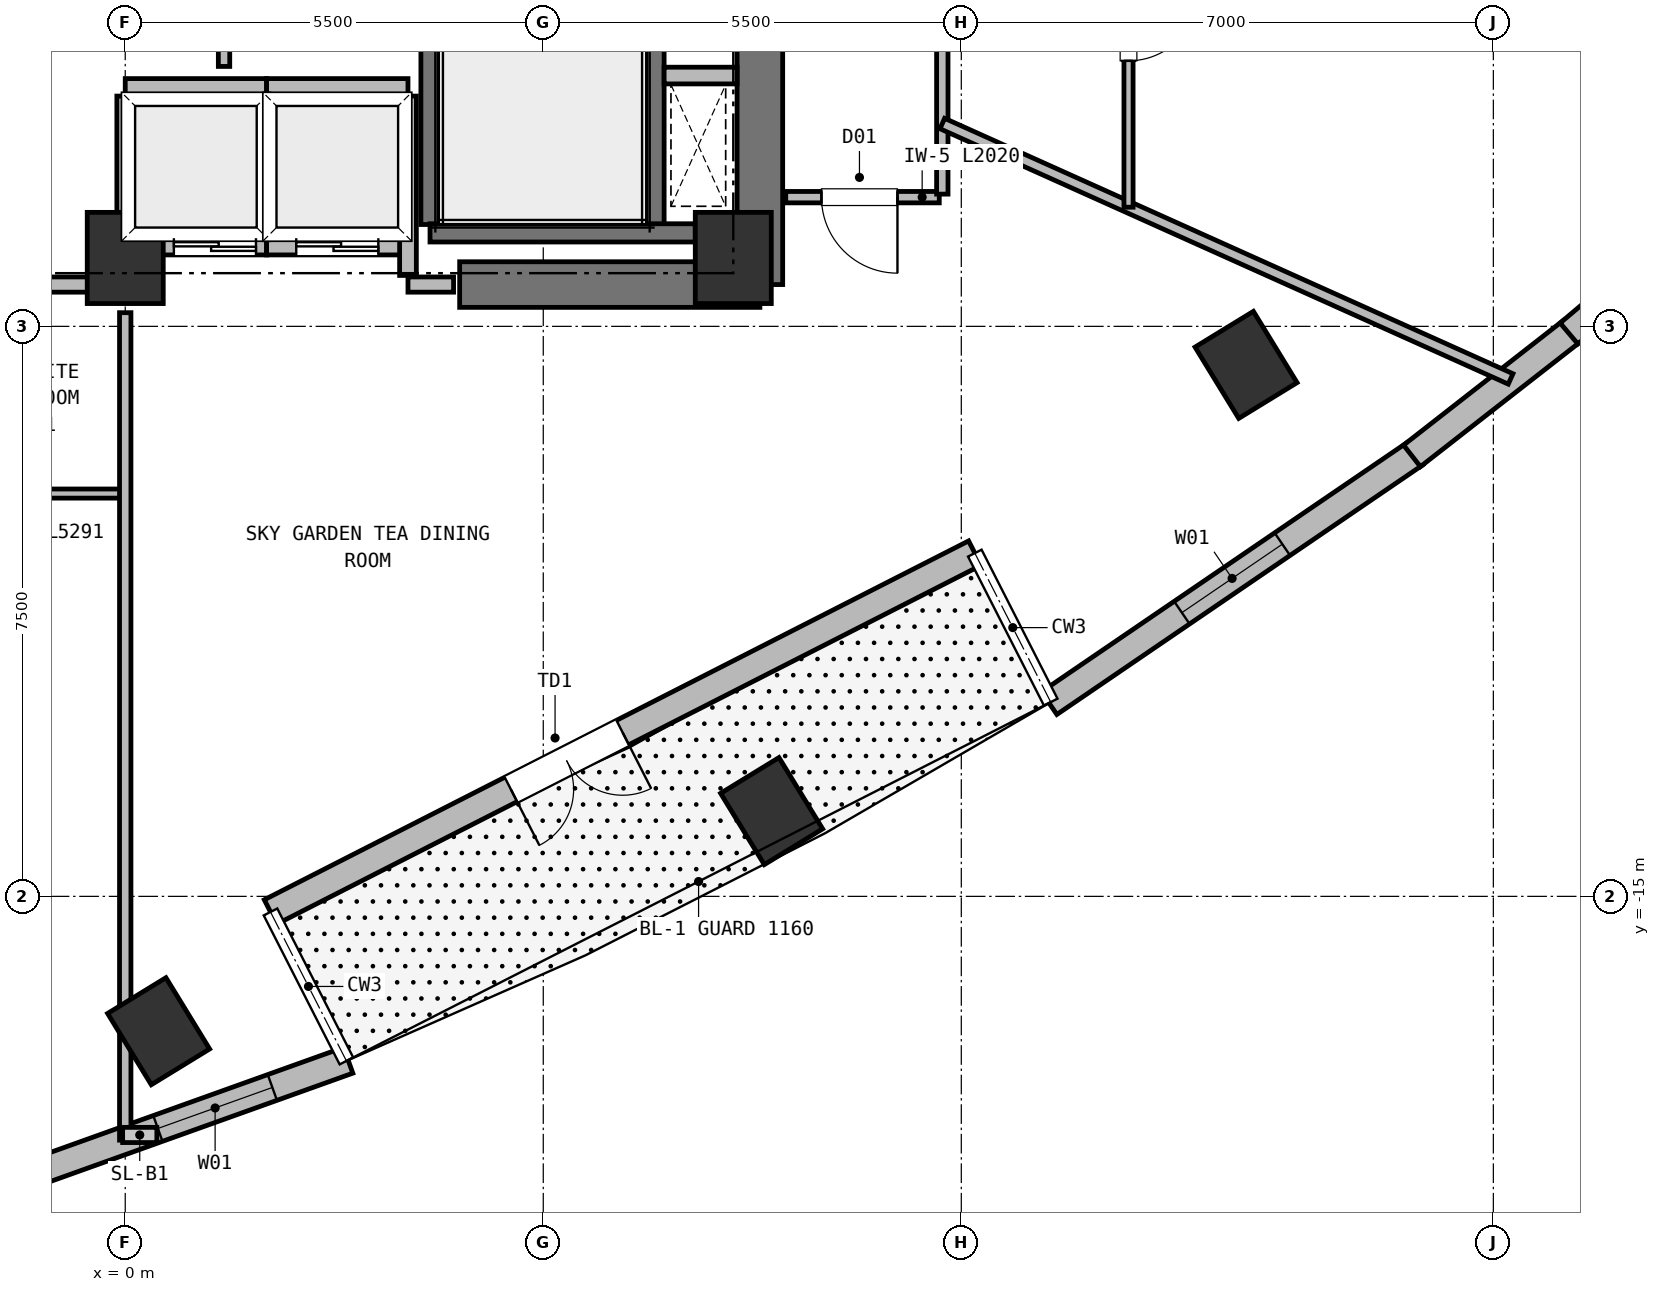
"""IFC4 building model, lengths in metres.
Left out: names, types, materials, properties, quantities, classifications, styles, units other than length and angle.
Written with IfcOpenShell. Run it as: python <this file> out.ifc"""

import sys

from ifc_helpers import new_model, si_unit, direction, frame, frame_2d, origin, origin_2d, place, context, subcontext, project, spatial, rectangle, extrude, element, fill, save


model = new_model("IFC4")
c1 = context("Model", 3, precision=1e-05, world=origin(), true_north=direction((0.0, 1.0)))
c2 = subcontext(c1, "Body", "Model", "MODEL_VIEW")
j1 = project(units=[si_unit("LENGTHUNIT", "METRE"), si_unit("PLANEANGLEUNIT", "RADIAN")], contexts=[c1])
p1 = place(None, origin())
s1 = spatial("IfcSite", under=j1, at=p1, CompositionType="ELEMENT")
p2 = place(p1, origin())
s2 = spatial("IfcBuilding", under=s1, at=p2, CompositionType="ELEMENT")
p3 = place(p2, frame((0.0, 0.0, 108.5)))
s3 = spatial("IfcBuildingStorey", under=s2, at=p3, CompositionType="ELEMENT", Elevation=108.5)
for number, where, z_axis, x_axis in (
    (1, (0.0, -6.6, 0.0), (0.0, 0.0, 1.0), (1.0, 0.0, 0.0)),
    (2, (8.0, -6.6, 0.0), (0.0, 0.0, 1.0), (1.0, 0.0, 0.0)),
):
    element("IfcColumn", number, at=place(p3, frame(where, z_axis=z_axis, x_axis=x_axis)), inside=s3, PredefinedType="COLUMN", context=c2, shape_type="SweptSolid", body=[
        extrude(rectangle(XDim=1.0, YDim=1.2, at=origin_2d()), origin(), (0.0, 0.0, 1.0), 3.75),
    ])
p4 = place(p3, frame((4.4, -6.95, 0.0), z_axis=(0.0, 0.0, 1.0), x_axis=(1.0, 0.0, 0.0)))
e3 = element("IfcWall", 3, at=p4, inside=s3, PredefinedType="SHEAR", context=c2, shape_type="SweptSolid", body=[
    extrude(rectangle(XDim=3.95, YDim=0.6, at=frame_2d((1.975, 0.0))), origin(), (0.0, 0.0, 1.0), 3.5),
])
p5 = place(p3, frame((8.35, -6.95, 0.0), z_axis=(0.0, 0.0, 1.0), x_axis=(0.0, 1.0, 0.0)))
e4 = element("IfcWall", 4, at=p5, inside=s3, PredefinedType="SHEAR", context=c2, shape_type="SweptSolid", body=[
    extrude(rectangle(XDim=8.1, YDim=0.6, at=frame_2d((4.05, 0.0))), origin(), (0.0, 0.0, 1.0), 3.5),
])
for number, where, z_axis, x_axis in (
    (5, (0.439, -16.774, 0.0), (0.0, 0.0, 1.0), (0.853, 0.522, 0.0)),
    (6, (8.504, -13.878, 0.0), (0.0, 0.0, 1.0), (0.853, 0.522, 0.0)),
    (7, (14.747, -8.007, 0.0), (0.0, 0.0, 1.0), (0.853, 0.522, 0.0)),
):
    element("IfcColumn", number, at=place(p3, frame(where, z_axis=z_axis, x_axis=x_axis)), inside=s3, PredefinedType="COLUMN", context=c2, shape_type="SweptSolid", body=[
        extrude(rectangle(XDim=0.9, YDim=1.1, at=origin_2d()), origin(), (0.0, 0.0, 1.0), 3.75),
    ])
p6 = place(p3, frame((11.178, -10.484, 0.0), z_axis=(0.0, 0.0, 1.0), x_axis=(-0.891006889171, -0.453989783419, 0.0)))
e8 = element("IfcWall", 8, at=p6, inside=s3, PredefinedType="SOLIDWALL", context=c2, shape_type="SweptSolid", body=[
    extrude(rectangle(XDim=10.4, YDim=0.36, at=frame_2d((5.2, 0.0))), origin(), (0.0, 0.0, 1.0), 3.15),
])
p7 = place(p6, frame((5.2, 0.0, 0.0)))
e9 = element("IfcOpeningElement", 9, at=p7, cuts=e8, PredefinedType="OPENING", context=c2, shape_type="SweptSolid", body=[
    extrude(rectangle(XDim=1.65, YDim=2.25, at=frame_2d((0.825, 1.125))), frame((0.0, 0.19, 0.0), z_axis=(0.0, -1.0, 0.0), x_axis=(1.0, 0.0, 0.0)), (0.0, 0.0, 1.0), 0.38),
])
p8 = place(p3, frame((2.934, -17.157, 0.0), z_axis=(0.0, 0.0, 1.0), x_axis=(-0.941431533916, -0.337204191773, 0.0)))
e10 = element("IfcWall", 10, at=p8, inside=s3, PredefinedType="SOLIDWALL", context=c2, shape_type="SweptSolid", body=[
    extrude(rectangle(XDim=5.827, YDim=0.36, at=frame_2d((2.914, 0.0))), origin(), (0.0, 0.0, 1.0), 3.5),
])
p9 = place(p8, frame((1.06, 0.0, 0.72)))
e11 = element("IfcOpeningElement", 11, at=p9, cuts=e10, PredefinedType="OPENING", context=c2, shape_type="SweptSolid", body=[
    extrude(rectangle(XDim=1.6, YDim=1.88, at=frame_2d((0.8, 0.94))), frame((0.0, 0.19, 0.0), z_axis=(0.0, -1.0, 0.0), x_axis=(1.0, 0.0, 0.0)), (0.0, 0.0, 1.0), 0.38),
])
p10 = place(p3, frame((16.97, -9.175, 0.0), z_axis=(0.0, 0.0, 1.0), x_axis=(-0.826151102753, -0.563448627134, 0.0)))
e12 = element("IfcWall", 12, at=p10, inside=s3, PredefinedType="SOLIDWALL", context=c2, shape_type="SweptSolid", body=[
    extrude(rectangle(XDim=5.827, YDim=0.36, at=frame_2d((2.914, 0.0))), origin(), (0.0, 0.0, 1.0), 3.5),
])
p11 = place(p10, frame((2.113, 0.0, 0.72)))
e13 = element("IfcOpeningElement", 13, at=p11, cuts=e12, PredefinedType="OPENING", context=c2, shape_type="SweptSolid", body=[
    extrude(rectangle(XDim=1.6, YDim=1.88, at=frame_2d((0.8, 0.94))), frame((0.0, 0.19, 0.0), z_axis=(0.0, -1.0, 0.0), x_axis=(1.0, 0.0, 0.0)), (0.0, 0.0, 1.0), 0.38),
])
p12 = place(p3, frame((19.034, -7.562, 0.0), z_axis=(0.0, 0.0, 1.0), x_axis=(-0.788341745542, -0.615237590071, 0.0)))
e14 = element("IfcWall", 14, at=p12, inside=s3, PredefinedType="SOLIDWALL", context=c2, shape_type="SweptSolid", body=[
    extrude(rectangle(XDim=2.67, YDim=0.36, at=frame_2d((1.335, 0.0))), origin(), (0.0, 0.0, 1.0), 3.5),
])
p13 = place(p3, frame((21.051, -5.856, 0.0), z_axis=(0.0, 0.0, 1.0), x_axis=(-0.763688985819, -0.64558433449, 0.0)))
e15 = element("IfcWall", 15, at=p13, inside=s3, PredefinedType="SOLIDWALL", context=c2, shape_type="SweptSolid", body=[
    extrude(rectangle(XDim=2.691, YDim=0.36, at=frame_2d((1.346, 0.0))), origin(), (0.0, 0.0, 1.0), 3.5),
])
p14 = place(p13, frame((0.646, 0.0, 0.72)))
e16 = element("IfcOpeningElement", 16, at=p14, cuts=e15, PredefinedType="OPENING", context=c2, shape_type="SweptSolid", body=[
    extrude(rectangle(XDim=1.4, YDim=1.84, at=frame_2d((0.7, 0.92))), frame((0.0, 0.19, 0.0), z_axis=(0.0, -1.0, 0.0), x_axis=(1.0, 0.0, 0.0)), (0.0, 0.0, 1.0), 0.38),
])
for number, where, z_axis, x_axis in (
    (17, (4.01, -6.16, 0.0), (0.0, 0.0, 1.0), (0.0, 1.0, 0.0)),
    (18, (6.97, -6.16, 0.0), (0.0, 0.0, 1.0), (0.0, 1.0, 0.0)),
):
    element("IfcWall", number, at=place(p3, frame(where, z_axis=z_axis, x_axis=x_axis)), inside=s3, PredefinedType="SHEAR", context=c2, shape_type="SweptSolid", body=[
        extrude(rectangle(XDim=7.22, YDim=0.24, at=frame_2d((3.61, 0.0))), origin(), (0.0, 0.0, 1.0), 3.5),
    ])
p15 = place(p3, frame((4.01, -6.27, 0.0), z_axis=(0.0, 0.0, 1.0), x_axis=(1.0, 0.0, 0.0)))
e19 = element("IfcWall", 19, at=p15, inside=s3, PredefinedType="SHEAR", context=c2, shape_type="SweptSolid", body=[
    extrude(rectangle(XDim=3.49, YDim=0.24, at=frame_2d((1.745, 0.0))), origin(), (0.0, 0.0, 1.0), 3.5),
])
p16 = place(p3, frame((7.09, -4.2, 0.0), z_axis=(0.0, 0.0, 1.0), x_axis=(1.0, 0.0, 0.0)))
e20 = element("IfcWall", 20, at=p16, inside=s3, PredefinedType="PARTITIONING", context=c2, shape_type="SweptSolid", body=[
    extrude(rectangle(XDim=0.96, YDim=0.22, at=frame_2d((0.48, 0.0))), origin(), (0.0, 0.0, 1.0), 3.5),
])
p17 = place(p3, frame((0.0, -6.45, 0.0), z_axis=(0.0, 0.0, 1.0), x_axis=(1.0, 0.0, 0.0)))
e21 = element("IfcWall", 21, at=p17, inside=s3, PredefinedType="PARTITIONING", context=c2, shape_type="SweptSolid", body=[
    extrude(rectangle(XDim=1.86, YDim=0.22, at=frame_2d((0.93, 0.0))), origin(), (0.0, 0.0, 1.0), 3.12),
])
p18 = place(p17, frame((0.64, 0.0, 0.0)))
e22 = element("IfcOpeningElement", 22, at=p18, cuts=e21, PredefinedType="OPENING", context=c2, shape_type="SweptSolid", body=[
    extrude(rectangle(XDim=1.08, YDim=2.15, at=frame_2d((0.54, 1.075))), frame((0.0, 0.12, 0.0), z_axis=(0.0, -1.0, 0.0), x_axis=(1.0, 0.0, 0.0)), (0.0, 0.0, 1.0), 0.24),
])
for number, where, z_axis, x_axis in (
    (23, (0.0, -4.35, 0.0), (0.0, 0.0, 1.0), (1.0, 0.0, 0.0)),
    (24, (0.0, -6.33, 0.0), (0.0, 0.0, 1.0), (0.0, 1.0, 0.0)),
    (25, (1.86, -6.33, 0.0), (0.0, 0.0, 1.0), (0.0, 1.0, 0.0)),
):
    element("IfcWall", number, at=place(p3, frame(where, z_axis=z_axis, x_axis=x_axis)), inside=s3, PredefinedType="PARTITIONING", context=c2, shape_type="SweptSolid", body=[
        extrude(rectangle(XDim=1.86, YDim=0.22, at=frame_2d((0.93, 0.0))), origin(), (0.0, 0.0, 1.0), 3.5),
    ])
p19 = place(p3, frame((1.86, -6.45, 0.0), z_axis=(0.0, 0.0, 1.0), x_axis=(1.0, 0.0, 0.0)))
e26 = element("IfcWall", 26, at=p19, inside=s3, PredefinedType="PARTITIONING", context=c2, shape_type="SweptSolid", body=[
    extrude(rectangle(XDim=1.86, YDim=0.22, at=frame_2d((0.93, 0.0))), origin(), (0.0, 0.0, 1.0), 3.12),
])
p20 = place(p19, frame((0.39, 0.0, 0.0)))
e27 = element("IfcOpeningElement", 27, at=p20, cuts=e26, PredefinedType="OPENING", context=c2, shape_type="SweptSolid", body=[
    extrude(rectangle(XDim=1.08, YDim=2.15, at=frame_2d((0.54, 1.075))), frame((0.0, 0.12, 0.0), z_axis=(0.0, -1.0, 0.0), x_axis=(1.0, 0.0, 0.0)), (0.0, 0.0, 1.0), 0.24),
])
p21 = place(p3, frame((1.86, -4.35, 0.0), z_axis=(0.0, 0.0, 1.0), x_axis=(1.0, 0.0, 0.0)))
e28 = element("IfcWall", 28, at=p21, inside=s3, PredefinedType="PARTITIONING", context=c2, shape_type="SweptSolid", body=[
    extrude(rectangle(XDim=1.86, YDim=0.22, at=frame_2d((0.93, 0.0))), origin(), (0.0, 0.0, 1.0), 3.5),
])
p22 = place(p3, frame((3.72, -6.83, 0.0), z_axis=(0.0, 0.0, 1.0), x_axis=(0.0, 1.0, 0.0)))
e29 = element("IfcWall", 29, at=p22, inside=s3, PredefinedType="PARTITIONING", context=c2, shape_type="SweptSolid", body=[
    extrude(rectangle(XDim=2.36, YDim=0.22, at=frame_2d((1.18, 0.0))), origin(), (0.0, 0.0, 1.0), 3.5),
])
p23 = place(p3, frame((-4.32, -6.95, 0.0), z_axis=(0.0, 0.0, 1.0), x_axis=(1.0, 0.0, 0.0)))
e30 = element("IfcWall", 30, at=p23, inside=s3, PredefinedType="PARTITIONING", context=c2, shape_type="SweptSolid", body=[
    extrude(rectangle(XDim=4.32, YDim=0.2, at=frame_2d((2.16, 0.0))), origin(), (0.0, 0.0, 1.0), 3.5),
])
p24 = place(p3, frame((3.72, -6.95, 0.0), z_axis=(0.0, 0.0, 1.0), x_axis=(1.0, 0.0, 0.0)))
e31 = element("IfcWall", 31, at=p24, inside=s3, PredefinedType="PARTITIONING", context=c2, shape_type="SweptSolid", body=[
    extrude(rectangle(XDim=0.6, YDim=0.2, at=frame_2d((0.3, 0.0))), origin(), (0.0, 0.0, 1.0), 3.5),
])
p25 = place(p3, frame((1.3, -4.08, 0.0), z_axis=(0.0, 0.0, 1.0), x_axis=(0.0, 1.0, 0.0)))
e32 = element("IfcWall", 32, at=p25, inside=s3, PredefinedType="PARTITIONING", context=c2, shape_type="SweptSolid", body=[
    extrude(rectangle(XDim=5.03, YDim=0.15, at=frame_2d((2.515, 0.0))), origin(), (0.0, 0.0, 1.0), 3.5),
])
p26 = place(p3, frame((10.71, -5.8, 0.0), z_axis=(0.0, 0.0, 1.0), x_axis=(-1.0, 0.0, 0.0)))
e33 = element("IfcWall", 33, at=p26, inside=s3, PredefinedType="PARTITIONING", context=c2, shape_type="SweptSolid", body=[
    extrude(rectangle(XDim=2.02, YDim=0.15, at=frame_2d((1.01, 0.0))), origin(), (0.0, 0.0, 1.0), 3.5),
])
p27 = place(p26, frame((0.55, 0.0, 0.0)))
e34 = element("IfcOpeningElement", 34, at=p27, cuts=e33, PredefinedType="OPENING", context=c2, shape_type="SweptSolid", body=[
    extrude(rectangle(XDim=1.0, YDim=2.15, at=frame_2d((0.5, 1.075))), frame((0.0, 0.085, 0.0), z_axis=(0.0, -1.0, 0.0), x_axis=(1.0, 0.0, 0.0)), (0.0, 0.0, 1.0), 0.17),
])
p28 = place(p3, frame((10.75, 7.16, 0.0), z_axis=(0.0, 0.0, 1.0), x_axis=(0.0, -1.0, 0.0)))
e35 = element("IfcWall", 35, at=p28, inside=s3, PredefinedType="PARTITIONING", context=c2, shape_type="SweptSolid", body=[
    extrude(rectangle(XDim=12.92, YDim=0.15, at=frame_2d((6.46, 0.0))), origin(), (0.0, 0.0, 1.0), 3.5),
])
p29 = place(p28, frame((1.527, 0.0, 0.0)))
e36 = element("IfcOpeningElement", 36, at=p29, cuts=e35, PredefinedType="OPENING", context=c2, shape_type="SweptSolid", body=[
    extrude(rectangle(XDim=1.0, YDim=2.15, at=frame_2d((0.5, 1.075))), frame((0.0, 0.085, 0.0), z_axis=(0.0, -1.0, 0.0), x_axis=(1.0, 0.0, 0.0)), (0.0, 0.0, 1.0), 0.17),
])
p30 = place(p28, frame((5.455, 0.0, 0.0)))
e37 = element("IfcOpeningElement", 37, at=p30, cuts=e35, PredefinedType="OPENING", context=c2, shape_type="SweptSolid", body=[
    extrude(rectangle(XDim=1.06, YDim=2.15, at=frame_2d((0.53, 1.075))), frame((0.0, 0.085, 0.0), z_axis=(0.0, -1.0, 0.0), x_axis=(1.0, 0.0, 0.0)), (0.0, 0.0, 1.0), 0.17),
])
p31 = place(p3, frame((0.0, -9.7, 0.0), z_axis=(0.0, 0.0, 1.0), x_axis=(-1.0, 0.0, 0.0)))
e38 = element("IfcWall", 38, at=p31, inside=s3, PredefinedType="PARTITIONING", context=c2, shape_type="SweptSolid", body=[
    extrude(rectangle(XDim=5.291, YDim=0.12, at=frame_2d((2.646, 0.0))), origin(), (0.0, 0.0, 1.0), 3.5),
])
p32 = place(p31, frame((2.186, 0.0, 0.0)))
e39 = element("IfcOpeningElement", 39, at=p32, cuts=e38, PredefinedType="OPENING", context=c2, shape_type="SweptSolid", body=[
    extrude(rectangle(XDim=0.92, YDim=2.1, at=frame_2d((0.46, 1.05))), frame((0.0, 0.07, 0.0), z_axis=(0.0, -1.0, 0.0), x_axis=(1.0, 0.0, 0.0)), (0.0, 0.0, 1.0), 0.14),
])
p33 = place(p3, frame((0.0, -7.32, 0.0), z_axis=(0.0, 0.0, 1.0), x_axis=(0.0, -1.0, 0.0)))
e40 = element("IfcWall", 40, at=p33, inside=s3, PredefinedType="PARTITIONING", context=c2, shape_type="SweptSolid", body=[
    extrude(rectangle(XDim=10.888, YDim=0.15, at=frame_2d((5.444, 0.0))), origin(), (0.0, 0.0, 1.0), 3.5),
])
p34 = place(p3, frame((10.75, -4.831, 0.0), z_axis=(0.0, 0.0, 1.0), x_axis=(0.912123674565, -0.409915115967, 0.0)))
e41 = element("IfcWall", 41, at=p34, inside=s3, PredefinedType="PARTITIONING", context=c2, shape_type="SweptSolid", body=[
    extrude(rectangle(XDim=8.198, YDim=0.15, at=frame_2d((4.099, 0.0))), origin(), (0.0, 0.0, 1.0), 3.5),
])
p35 = place(p3, frame((13.2, -1.16, 0.0), z_axis=(0.0, 0.0, 1.0), x_axis=(0.0, -1.0, 0.0)))
e42 = element("IfcWall", 42, at=p35, inside=s3, PredefinedType="PARTITIONING", context=c2, shape_type="SweptSolid", body=[
    extrude(rectangle(XDim=4.772, YDim=0.12, at=frame_2d((2.386, 0.0))), origin(), (0.0, 0.0, 1.0), 3.5),
])
p36 = place(p35, frame((1.926, 0.0, 0.0)))
e43 = element("IfcOpeningElement", 43, at=p36, cuts=e42, PredefinedType="OPENING", context=c2, shape_type="SweptSolid", body=[
    extrude(rectangle(XDim=0.92, YDim=2.1, at=frame_2d((0.46, 1.05))), frame((0.0, 0.07, 0.0), z_axis=(0.0, -1.0, 0.0), x_axis=(1.0, 0.0, 0.0)), (0.0, 0.0, 1.0), 0.14),
])
p37 = place(p7, origin())
e44 = element("IfcDoor", 44, at=p37, inside=s3, OperationType="DOUBLE_DOOR_SINGLE_SWING", PredefinedType="DOOR", context=c2, shape_type="SweptSolid", body=[
    extrude(rectangle(XDim=1.65, YDim=2.25, at=frame_2d((0.825, 1.125))), frame((0.0, 0.025, 0.0), z_axis=(0.0, -1.0, 0.0), x_axis=(1.0, 0.0, 0.0)), (0.0, 0.0, 1.0), 0.05),
])
fill(e9, e44)
p38 = place(p9, origin())
e45 = element("IfcWindow", 45, at=p38, inside=s3, PartitioningType="SINGLE_PANEL", PredefinedType="WINDOW", context=c2, shape_type="SweptSolid", body=[
    extrude(rectangle(XDim=1.6, YDim=1.88, at=frame_2d((0.8, 0.94))), frame((0.0, 0.03, 0.0), z_axis=(0.0, -1.0, 0.0), x_axis=(1.0, 0.0, 0.0)), (0.0, 0.0, 1.0), 0.06),
])
fill(e11, e45)
p39 = place(p11, origin())
e46 = element("IfcWindow", 46, at=p39, inside=s3, PartitioningType="SINGLE_PANEL", PredefinedType="WINDOW", context=c2, shape_type="SweptSolid", body=[
    extrude(rectangle(XDim=1.6, YDim=1.88, at=frame_2d((0.8, 0.94))), frame((0.0, 0.03, 0.0), z_axis=(0.0, -1.0, 0.0), x_axis=(1.0, 0.0, 0.0)), (0.0, 0.0, 1.0), 0.06),
])
fill(e13, e46)
p40 = place(p18, origin())
e47 = element("IfcDoor", 47, at=p40, inside=s3, OperationType="DOUBLE_DOOR_SLIDING", PredefinedType="DOOR", context=c2, shape_type="SweptSolid", body=[
    extrude(rectangle(XDim=1.08, YDim=2.15, at=frame_2d((0.54, 1.075))), frame((0.0, 0.025, 0.0), z_axis=(0.0, -1.0, 0.0), x_axis=(1.0, 0.0, 0.0)), (0.0, 0.0, 1.0), 0.05),
])
fill(e22, e47)
p41 = place(p20, origin())
e48 = element("IfcDoor", 48, at=p41, inside=s3, OperationType="DOUBLE_DOOR_SLIDING", PredefinedType="DOOR", context=c2, shape_type="SweptSolid", body=[
    extrude(rectangle(XDim=1.08, YDim=2.15, at=frame_2d((0.54, 1.075))), frame((0.0, 0.025, 0.0), z_axis=(0.0, -1.0, 0.0), x_axis=(1.0, 0.0, 0.0)), (0.0, 0.0, 1.0), 0.05),
])
fill(e27, e48)
p42 = place(p36, origin())
e49 = element("IfcDoor", 49, at=p42, inside=s3, OperationType="SINGLE_SWING_LEFT", PredefinedType="DOOR", context=c2, shape_type="SweptSolid", body=[
    extrude(rectangle(XDim=0.92, YDim=2.1, at=frame_2d((0.46, 1.05))), frame((0.0, 0.025, 0.0), z_axis=(0.0, -1.0, 0.0), x_axis=(1.0, 0.0, 0.0)), (0.0, 0.0, 1.0), 0.05),
])
fill(e43, e49)
p43 = place(p27, origin())
e50 = element("IfcDoor", 50, at=p43, inside=s3, OperationType="SINGLE_SWING_LEFT", PredefinedType="DOOR", context=c2, shape_type="SweptSolid", body=[
    extrude(rectangle(XDim=1.0, YDim=2.15, at=frame_2d((0.5, 1.075))), frame((0.0, 0.025, 0.0), z_axis=(0.0, -1.0, 0.0), x_axis=(1.0, 0.0, 0.0)), (0.0, 0.0, 1.0), 0.05),
])
fill(e34, e50)
save(model, sys.argv[1])
